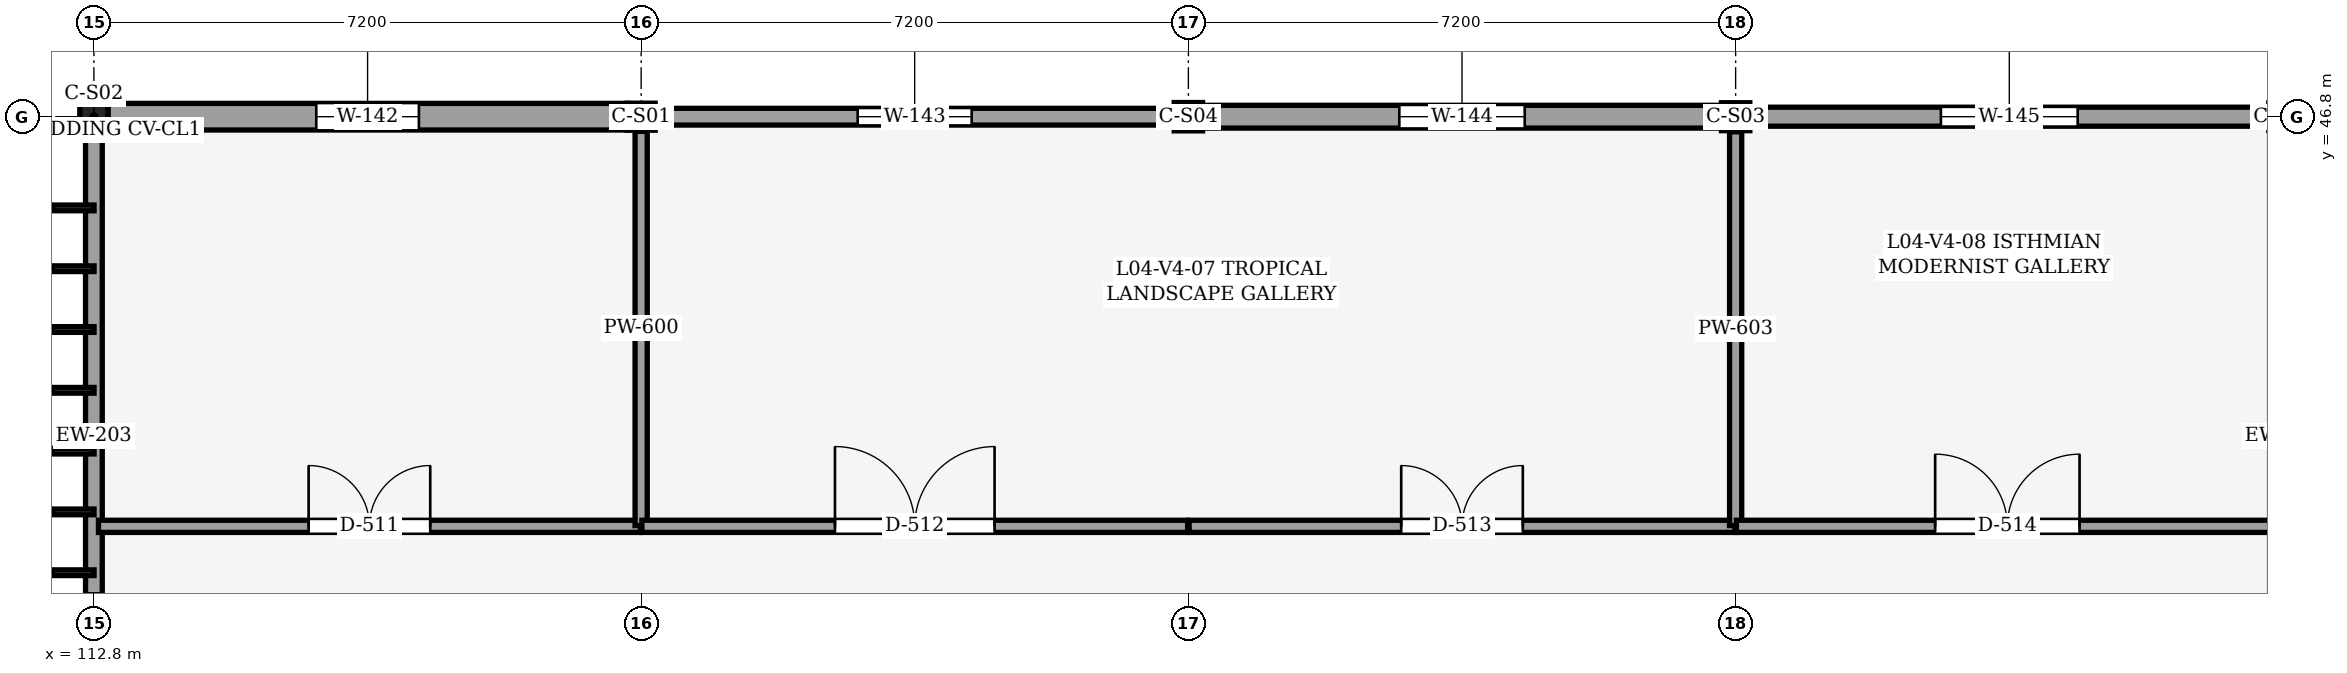
"""IFC4 building model, lengths in metres.
Left out: names, types, materials, properties, quantities, classifications, styles, units other than length and angle.
Written with IfcOpenShell. Run it as: python <this file> out.ifc"""

import sys

from ifc_helpers import new_model, si_unit, direction, frame, frame_2d, origin, origin_2d, place, context, subcontext, project, spatial, rectangle, i_section, extrude, element, fill, save


model = new_model("IFC4")
c1 = context("Model", 3, precision=1e-05, world=origin(), true_north=direction((0.0, 1.0)))
c2 = subcontext(c1, "Body", "Model", "MODEL_VIEW")
j1 = project(units=[si_unit("LENGTHUNIT", "METRE"), si_unit("PLANEANGLEUNIT", "RADIAN")], contexts=[c1])
p1 = place(None, origin())
s1 = spatial("IfcSite", under=j1, at=p1, CompositionType="ELEMENT")
p2 = place(p1, origin())
s2 = spatial("IfcBuilding", under=s1, at=p2, CompositionType="ELEMENT")
p3 = place(p2, frame((0.0, 0.0, 19.8)))
s3 = spatial("IfcBuildingStorey", under=s2, at=p3, CompositionType="ELEMENT", Elevation=19.8)
p4 = place(p3, frame((112.8, 46.8, 0.0), z_axis=(0.0, 0.0, 1.0), x_axis=(1.0, 0.0, 0.0)))
e1 = element("IfcColumn", 1, at=p4, inside=s3, PredefinedType="COLUMN", context=c2, shape_type="SweptSolid", body=[
    extrude(i_section(OverallWidth=0.371, OverallDepth=0.363, WebThickness=0.013, FlangeThickness=0.022, FilletRadius=0.025, at=origin_2d()), origin(), (0.0, 0.0, 1.0), 4.8),
])
p5 = place(p3, frame((120.0, 46.8, 0.0), z_axis=(0.0, 0.0, 1.0), x_axis=(1.0, 0.0, 0.0)))
e2 = element("IfcColumn", 2, at=p5, inside=s3, PredefinedType="COLUMN", context=c2, shape_type="SweptSolid", body=[
    extrude(i_section(OverallWidth=0.368, OverallDepth=0.356, WebThickness=0.011, FlangeThickness=0.018, FilletRadius=0.025, at=origin_2d()), origin(), (0.0, 0.0, 1.0), 4.8),
])
p6 = place(p3, frame((127.2, 46.8, 0.0), z_axis=(0.0, 0.0, 1.0), x_axis=(1.0, 0.0, 0.0)))
e3 = element("IfcColumn", 3, at=p6, inside=s3, PredefinedType="COLUMN", context=c2, shape_type="SweptSolid", body=[
    extrude(i_section(OverallWidth=0.373, OverallDepth=0.373, WebThickness=0.016, FlangeThickness=0.026, FilletRadius=0.025, at=origin_2d()), origin(), (0.0, 0.0, 1.0), 4.8),
])
p7 = place(p3, frame((134.4, 46.8, 0.0), z_axis=(0.0, 0.0, 1.0), x_axis=(1.0, 0.0, 0.0)))
e4 = element("IfcColumn", 4, at=p7, inside=s3, PredefinedType="COLUMN", context=c2, shape_type="SweptSolid", body=[
    extrude(i_section(OverallWidth=0.373, OverallDepth=0.368, WebThickness=0.015, FlangeThickness=0.024, FilletRadius=0.025, at=origin_2d()), origin(), (0.0, 0.0, 1.0), 4.8),
])
p8 = place(p3, frame((112.986, 46.8, 0.0), z_axis=(0.0, 0.0, 1.0), x_axis=(1.0, 0.0, 0.0)))
e5 = element("IfcWall", 5, at=p8, inside=s3, PredefinedType="SOLIDWALL", context=c2, shape_type="SweptSolid", body=[
    extrude(rectangle(XDim=6.83, YDim=0.35, at=frame_2d((3.415, 0.0))), origin(), (0.0, 0.0, 1.0), 4.027),
])
p9 = place(p8, frame((2.74, 0.0, 0.9)))
e6 = element("IfcOpeningElement", 6, at=p9, cuts=e5, PredefinedType="OPENING", context=c2, shape_type="SweptSolid", body=[
    extrude(rectangle(XDim=1.35, YDim=1.5, at=frame_2d((0.675, 0.75))), frame((0.0, 0.185, 0.0), z_axis=(0.0, -1.0, 0.0), x_axis=(1.0, 0.0, 0.0)), (0.0, 0.0, 1.0), 0.371),
])
p10 = place(p3, frame((120.184, 46.8, 0.0), z_axis=(0.0, 0.0, 1.0), x_axis=(1.0, 0.0, 0.0)))
e7 = element("IfcWall", 7, at=p10, inside=s3, PredefinedType="SOLIDWALL", context=c2, shape_type="SweptSolid", body=[
    extrude(rectangle(XDim=6.829, YDim=0.22, at=frame_2d((3.415, 0.0))), origin(), (0.0, 0.0, 1.0), 4.255),
])
p11 = place(p10, frame((2.665, 0.0, 0.9)))
e8 = element("IfcOpeningElement", 8, at=p11, cuts=e7, PredefinedType="OPENING", context=c2, shape_type="SweptSolid", body=[
    extrude(rectangle(XDim=1.5, YDim=1.5, at=frame_2d((0.75, 0.75))), frame((0.0, 0.12, 0.0), z_axis=(0.0, -1.0, 0.0), x_axis=(1.0, 0.0, 0.0)), (0.0, 0.0, 1.0), 0.24),
])
p12 = place(p3, frame((127.386, 46.8, 0.0), z_axis=(0.0, 0.0, 1.0), x_axis=(1.0, 0.0, 0.0)))
e9 = element("IfcWall", 9, at=p12, inside=s3, PredefinedType="SOLIDWALL", context=c2, shape_type="SweptSolid", body=[
    extrude(rectangle(XDim=6.827, YDim=0.3, at=frame_2d((3.414, 0.0))), origin(), (0.0, 0.0, 1.0), 3.953),
])
p13 = place(p12, frame((2.588, 0.0, 0.9)))
e10 = element("IfcOpeningElement", 10, at=p13, cuts=e9, PredefinedType="OPENING", context=c2, shape_type="SweptSolid", body=[
    extrude(rectangle(XDim=1.65, YDim=1.5, at=frame_2d((0.825, 0.75))), frame((0.0, 0.16, 0.0), z_axis=(0.0, -1.0, 0.0), x_axis=(1.0, 0.0, 0.0)), (0.0, 0.0, 1.0), 0.321),
])
p14 = place(p3, frame((134.586, 46.8, 0.0), z_axis=(0.0, 0.0, 1.0), x_axis=(1.0, 0.0, 0.0)))
e11 = element("IfcWall", 11, at=p14, inside=s3, PredefinedType="SOLIDWALL", context=c2, shape_type="SweptSolid", body=[
    extrude(rectangle(XDim=6.828, YDim=0.25, at=frame_2d((3.414, 0.0))), origin(), (0.0, 0.0, 1.0), 4.011),
])
p15 = place(p14, frame((2.514, 0.0, 0.9)))
e12 = element("IfcOpeningElement", 12, at=p15, cuts=e11, PredefinedType="OPENING", context=c2, shape_type="SweptSolid", body=[
    extrude(rectangle(XDim=1.8, YDim=1.5, at=frame_2d((0.9, 0.75))), frame((0.0, 0.135, 0.0), z_axis=(0.0, -1.0, 0.0), x_axis=(1.0, 0.0, 0.0)), (0.0, 0.0, 1.0), 0.271),
])
p16 = place(p3, frame((112.8, 38.578, 0.0), z_axis=(0.0, 0.0, 1.0), x_axis=(0.0, 1.0, 0.0)))
e13 = element("IfcWall", 13, at=p16, inside=s3, PredefinedType="SOLIDWALL", context=c2, shape_type="SweptSolid", body=[
    extrude(rectangle(XDim=8.041, YDim=0.22, at=frame_2d((4.02, 0.0))), origin(), (0.0, 0.0, 1.0), 3.704),
])
p17 = place(p16, frame((0.75, 0.0, 0.9)))
e14 = element("IfcOpeningElement", 14, at=p17, cuts=e13, PredefinedType="OPENING", context=c2, shape_type="SweptSolid", body=[
    extrude(rectangle(XDim=1.2, YDim=1.5, at=frame_2d((0.6, 0.75))), frame((0.0, 0.12, 0.0), z_axis=(0.0, -1.0, 0.0), x_axis=(1.0, 0.0, 0.0)), (0.0, 0.0, 1.0), 0.24),
])
p18 = place(p3, frame((112.86, 41.41, 0.0), z_axis=(0.0, 0.0, 1.0), x_axis=(1.0, 0.0, 0.0)))
e15 = element("IfcWall", 15, at=p18, inside=s3, PredefinedType="PARTITIONING", context=c2, shape_type="SweptSolid", body=[
    extrude(rectangle(XDim=7.13, YDim=0.16, at=frame_2d((3.565, 0.0))), origin(), (0.0, 0.0, 1.0), 4.56),
])
p19 = place(p18, frame((2.765, 0.0, 0.0)))
e16 = element("IfcOpeningElement", 16, at=p19, cuts=e15, PredefinedType="OPENING", context=c2, shape_type="SweptSolid", body=[
    extrude(rectangle(XDim=1.6, YDim=2.35, at=frame_2d((0.8, 1.175))), frame((0.0, 0.09, 0.0), z_axis=(0.0, -1.0, 0.0), x_axis=(1.0, 0.0, 0.0)), (0.0, 0.0, 1.0), 0.18),
])
p20 = place(p3, frame((120.0, 41.42, 0.0), z_axis=(0.0, 0.0, 1.0), x_axis=(0.0, 1.0, 0.0)))
e17 = element("IfcWall", 17, at=p20, inside=s3, PredefinedType="PARTITIONING", context=c2, shape_type="SweptSolid", body=[
    extrude(rectangle(XDim=5.187, YDim=0.16, at=frame_2d((2.594, 0.0))), origin(), (0.0, 0.0, 1.0), 3.633),
])
p21 = place(p3, frame((120.01, 41.41, 0.0), z_axis=(0.0, 0.0, 1.0), x_axis=(1.0, 0.0, 0.0)))
e18 = element("IfcWall", 18, at=p21, inside=s3, PredefinedType="PARTITIONING", context=c2, shape_type="SweptSolid", body=[
    extrude(rectangle(XDim=7.18, YDim=0.16, at=frame_2d((3.59, 0.0))), origin(), (0.0, 0.0, 1.0), 4.56),
])
p22 = place(p21, frame((2.54, 0.0, 0.0)))
e19 = element("IfcOpeningElement", 19, at=p22, cuts=e18, PredefinedType="OPENING", context=c2, shape_type="SweptSolid", body=[
    extrude(rectangle(XDim=2.1, YDim=2.5, at=frame_2d((1.05, 1.25))), frame((0.0, 0.09, 0.0), z_axis=(0.0, -1.0, 0.0), x_axis=(1.0, 0.0, 0.0)), (0.0, 0.0, 1.0), 0.18),
])
p23 = place(p3, frame((127.21, 41.41, 0.0), z_axis=(0.0, 0.0, 1.0), x_axis=(1.0, 0.0, 0.0)))
e20 = element("IfcWall", 20, at=p23, inside=s3, PredefinedType="PARTITIONING", context=c2, shape_type="SweptSolid", body=[
    extrude(rectangle(XDim=7.18, YDim=0.16, at=frame_2d((3.59, 0.0))), origin(), (0.0, 0.0, 1.0), 4.56),
])
p24 = place(p23, frame((2.79, 0.0, 0.0)))
e21 = element("IfcOpeningElement", 21, at=p24, cuts=e20, PredefinedType="OPENING", context=c2, shape_type="SweptSolid", body=[
    extrude(rectangle(XDim=1.6, YDim=2.35, at=frame_2d((0.8, 1.175))), frame((0.0, 0.09, 0.0), z_axis=(0.0, -1.0, 0.0), x_axis=(1.0, 0.0, 0.0)), (0.0, 0.0, 1.0), 0.18),
])
p25 = place(p3, frame((134.4, 41.42, 0.0), z_axis=(0.0, 0.0, 1.0), x_axis=(0.0, 1.0, 0.0)))
e22 = element("IfcWall", 22, at=p25, inside=s3, PredefinedType="PARTITIONING", context=c2, shape_type="SweptSolid", body=[
    extrude(rectangle(XDim=5.181, YDim=0.16, at=frame_2d((2.591, 0.0))), origin(), (0.0, 0.0, 1.0), 3.788),
])
p26 = place(p3, frame((134.41, 41.41, 0.0), z_axis=(0.0, 0.0, 1.0), x_axis=(1.0, 0.0, 0.0)))
e23 = element("IfcWall", 23, at=p26, inside=s3, PredefinedType="PARTITIONING", context=c2, shape_type="SweptSolid", body=[
    extrude(rectangle(XDim=7.13, YDim=0.16, at=frame_2d((3.565, 0.0))), origin(), (0.0, 0.0, 1.0), 4.56),
])
p27 = place(p26, frame((2.615, 0.0, 0.0)))
e24 = element("IfcOpeningElement", 24, at=p27, cuts=e23, PredefinedType="OPENING", context=c2, shape_type="SweptSolid", body=[
    extrude(rectangle(XDim=1.9, YDim=2.45, at=frame_2d((0.95, 1.225))), frame((0.0, 0.09, 0.0), z_axis=(0.0, -1.0, 0.0), x_axis=(1.0, 0.0, 0.0)), (0.0, 0.0, 1.0), 0.18),
])
p28 = place(p9, origin())
e25 = element("IfcWindow", 25, at=p28, inside=s3, PartitioningType="SINGLE_PANEL", PredefinedType="WINDOW", context=c2, shape_type="SweptSolid", body=[
    extrude(rectangle(XDim=1.35, YDim=1.5, at=frame_2d((0.675, 0.75))), frame((0.0, 0.03, 0.0), z_axis=(0.0, -1.0, 0.0), x_axis=(1.0, 0.0, 0.0)), (0.0, 0.0, 1.0), 0.06),
])
fill(e6, e25)
p29 = place(p11, origin())
e26 = element("IfcWindow", 26, at=p29, inside=s3, PartitioningType="SINGLE_PANEL", PredefinedType="WINDOW", context=c2, shape_type="SweptSolid", body=[
    extrude(rectangle(XDim=1.5, YDim=1.5, at=frame_2d((0.75, 0.75))), frame((0.0, 0.03, 0.0), z_axis=(0.0, -1.0, 0.0), x_axis=(1.0, 0.0, 0.0)), (0.0, 0.0, 1.0), 0.06),
])
fill(e8, e26)
p30 = place(p13, origin())
e27 = element("IfcWindow", 27, at=p30, inside=s3, PartitioningType="SINGLE_PANEL", PredefinedType="WINDOW", context=c2, shape_type="SweptSolid", body=[
    extrude(rectangle(XDim=1.65, YDim=1.5, at=frame_2d((0.825, 0.75))), frame((0.0, 0.03, 0.0), z_axis=(0.0, -1.0, 0.0), x_axis=(1.0, 0.0, 0.0)), (0.0, 0.0, 1.0), 0.06),
])
fill(e10, e27)
p31 = place(p15, origin())
e28 = element("IfcWindow", 28, at=p31, inside=s3, PartitioningType="SINGLE_PANEL", PredefinedType="WINDOW", context=c2, shape_type="SweptSolid", body=[
    extrude(rectangle(XDim=1.8, YDim=1.5, at=frame_2d((0.9, 0.75))), frame((0.0, 0.03, 0.0), z_axis=(0.0, -1.0, 0.0), x_axis=(1.0, 0.0, 0.0)), (0.0, 0.0, 1.0), 0.06),
])
fill(e12, e28)
p32 = place(p19, origin())
e29 = element("IfcDoor", 29, at=p32, inside=s3, OperationType="DOUBLE_DOOR_SINGLE_SWING", PredefinedType="DOOR", context=c2, shape_type="SweptSolid", body=[
    extrude(rectangle(XDim=1.6, YDim=2.35, at=frame_2d((0.8, 1.175))), frame((0.0, 0.025, 0.0), z_axis=(0.0, -1.0, 0.0), x_axis=(1.0, 0.0, 0.0)), (0.0, 0.0, 1.0), 0.05),
])
fill(e16, e29)
p33 = place(p22, origin())
e30 = element("IfcDoor", 30, at=p33, inside=s3, OperationType="DOUBLE_DOOR_SINGLE_SWING", PredefinedType="DOOR", context=c2, shape_type="SweptSolid", body=[
    extrude(rectangle(XDim=2.1, YDim=2.5, at=frame_2d((1.05, 1.25))), frame((0.0, 0.025, 0.0), z_axis=(0.0, -1.0, 0.0), x_axis=(1.0, 0.0, 0.0)), (0.0, 0.0, 1.0), 0.05),
])
fill(e19, e30)
p34 = place(p24, origin())
e31 = element("IfcDoor", 31, at=p34, inside=s3, OperationType="DOUBLE_DOOR_SINGLE_SWING", PredefinedType="DOOR", context=c2, shape_type="SweptSolid", body=[
    extrude(rectangle(XDim=1.6, YDim=2.35, at=frame_2d((0.8, 1.175))), frame((0.0, 0.025, 0.0), z_axis=(0.0, -1.0, 0.0), x_axis=(1.0, 0.0, 0.0)), (0.0, 0.0, 1.0), 0.05),
])
fill(e21, e31)
p35 = place(p27, origin())
e32 = element("IfcDoor", 32, at=p35, inside=s3, OperationType="DOUBLE_DOOR_SINGLE_SWING", PredefinedType="DOOR", context=c2, shape_type="SweptSolid", body=[
    extrude(rectangle(XDim=1.9, YDim=2.45, at=frame_2d((0.95, 1.225))), frame((0.0, 0.025, 0.0), z_axis=(0.0, -1.0, 0.0), x_axis=(1.0, 0.0, 0.0)), (0.0, 0.0, 1.0), 0.05),
])
fill(e24, e32)
save(model, sys.argv[1])
